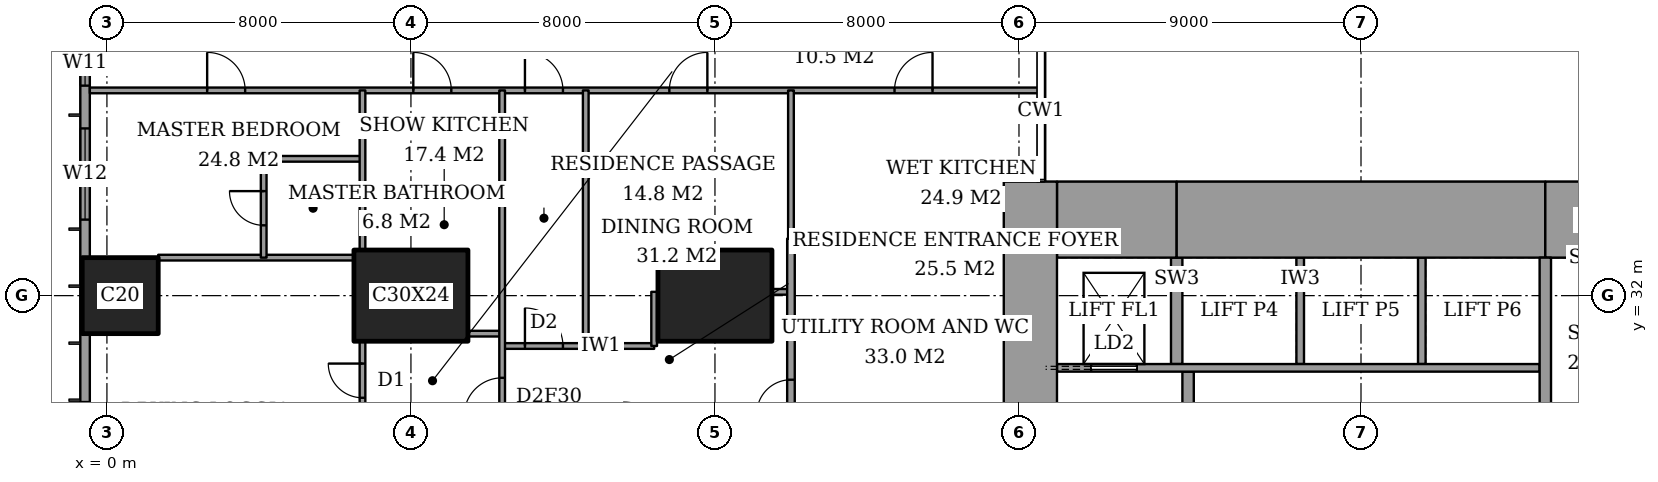
"""IFC4 building model, lengths in metres.
Left out: names, types, materials, properties, quantities, classifications, styles, units other than length and angle.
Written with IfcOpenShell. Run it as: python <this file> out.ifc"""

import sys

from ifc_helpers import new_model, si_unit, direction, frame, frame_2d, origin, origin_2d, place, context, subcontext, project, spatial, rectangle, extrude, element, fill, save


model = new_model("IFC4")
c1 = context("Model", 3, precision=1e-05, world=origin(), true_north=direction((0.0, 1.0)))
c2 = subcontext(c1, "Body", "Model", "MODEL_VIEW")
j1 = project(units=[si_unit("LENGTHUNIT", "METRE"), si_unit("PLANEANGLEUNIT", "RADIAN")], contexts=[c1])
p1 = place(None, origin())
s1 = spatial("IfcSite", under=j1, at=p1, CompositionType="ELEMENT")
p2 = place(p1, origin())
s2 = spatial("IfcBuilding", under=s1, at=p2, CompositionType="ELEMENT")
p3 = place(p2, frame((0.0, 0.0, 164.6)))
s3 = spatial("IfcBuildingStorey", under=s2, at=p3, CompositionType="ELEMENT", Elevation=164.6)
p4 = place(p3, frame((0.35, 32.0, 0.0), z_axis=(0.0, 0.0, 1.0), x_axis=(1.0, 0.0, 0.0)))
e1 = element("IfcColumn", 1, at=p4, inside=s3, PredefinedType="COLUMN", context=c2, shape_type="SweptSolid", body=[
    extrude(rectangle(XDim=2.0, YDim=2.0, at=origin_2d()), origin(), (0.0, 0.0, 1.0), 3.6),
])
for number, where, z_axis, x_axis in (
    (2, (8.0, 32.0, 0.0), (0.0, 0.0, 1.0), (1.0, 0.0, 0.0)),
    (3, (16.0, 32.0, 0.0), (0.0, 0.0, 1.0), (1.0, 0.0, 0.0)),
):
    element("IfcColumn", number, at=place(p3, frame(where, z_axis=z_axis, x_axis=x_axis)), inside=s3, PredefinedType="COLUMN", context=c2, shape_type="SweptSolid", body=[
        extrude(rectangle(XDim=3.0, YDim=2.4, at=origin_2d()), origin(), (0.0, 0.0, 1.0), 3.6),
    ])
p5 = place(p3, frame((25.0, 34.0, 0.0), z_axis=(0.0, 0.0, 1.0), x_axis=(1.0, 0.0, 0.0)))
e4 = element("IfcWall", 4, at=p5, inside=s3, PredefinedType="SHEAR", context=c2, shape_type="SweptSolid", body=[
    extrude(rectangle(XDim=3.15, YDim=2.0, at=frame_2d((1.575, 0.0))), origin(), (0.0, 0.0, 1.0), 3.6),
])
p6 = place(p3, frame((28.15, 34.0, 0.0), z_axis=(0.0, 0.0, 1.0), x_axis=(1.0, 0.0, 0.0)))
e5 = element("IfcWall", 5, at=p6, inside=s3, PredefinedType="SHEAR", context=c2, shape_type="SweptSolid", body=[
    extrude(rectangle(XDim=9.7, YDim=2.0, at=frame_2d((4.85, 0.0))), origin(), (0.0, 0.0, 1.0), 3.6),
])
p7 = place(p3, frame((37.85, 34.0, 0.0), z_axis=(0.0, 0.0, 1.0), x_axis=(1.0, 0.0, 0.0)))
e6 = element("IfcWall", 6, at=p7, inside=s3, PredefinedType="SHEAR", context=c2, shape_type="SweptSolid", body=[
    extrude(rectangle(XDim=3.15, YDim=2.0, at=frame_2d((1.575, 0.0))), origin(), (0.0, 0.0, 1.0), 3.6),
])
p8 = place(p3, frame((24.3, 23.15, 0.0), z_axis=(0.0, 0.0, 1.0), x_axis=(0.0, 1.0, 0.0)))
e7 = element("IfcWall", 7, at=p8, inside=s3, PredefinedType="SHEAR", context=c2, shape_type="SweptSolid", body=[
    extrude(rectangle(XDim=11.85, YDim=1.4, at=frame_2d((5.925, 0.0))), origin(), (0.0, 0.0, 1.0), 3.6),
])
p9 = place(p8, frame((0.75, 0.0, 0.0)))
e8 = element("IfcOpeningElement", 8, at=p9, cuts=e7, PredefinedType="OPENING", context=c2, shape_type="SweptSolid", body=[
    extrude(rectangle(XDim=1.8, YDim=2.4, at=frame_2d((0.9, 1.2))), frame((0.0, 0.71, 0.0), z_axis=(0.0, -1.0, 0.0), x_axis=(1.0, 0.0, 0.0)), (0.0, 0.0, 1.0), 1.42),
])
p10 = place(p3, frame((37.85, 24.85, 0.0), z_axis=(0.0, 0.0, 1.0), x_axis=(0.0, 1.0, 0.0)))
e9 = element("IfcWall", 9, at=p10, inside=s3, PredefinedType="SHEAR", context=c2, shape_type="SweptSolid", body=[
    extrude(rectangle(XDim=8.15, YDim=0.3, at=frame_2d((4.075, 0.0))), origin(), (0.0, 0.0, 1.0), 3.6),
])
p11 = place(p3, frame((28.45, 23.3, 0.0), z_axis=(0.0, 0.0, 1.0), x_axis=(0.0, 1.0, 0.0)))
e10 = element("IfcWall", 10, at=p11, inside=s3, PredefinedType="PARTITIONING", context=c2, shape_type="SweptSolid", body=[
    extrude(rectangle(XDim=6.7, YDim=0.3, at=frame_2d((3.35, 0.0))), origin(), (0.0, 0.0, 1.0), 3.6),
])
p12 = place(p11, frame((2.7, 0.0, 0.0)))
e11 = element("IfcOpeningElement", 11, at=p12, cuts=e10, PredefinedType="OPENING", context=c2, shape_type="SweptSolid", body=[
    extrude(rectangle(XDim=1.2, YDim=2.1, at=frame_2d((0.6, 1.05))), frame((0.0, 0.16, 0.0), z_axis=(0.0, -1.0, 0.0), x_axis=(1.0, 0.0, 0.0)), (0.0, 0.0, 1.0), 0.32),
])
p13 = place(p3, frame((-0.575, 44.825, 0.0), z_axis=(0.0, 0.0, 1.0), x_axis=(0.0, -1.0, 0.0)))
e12 = element("IfcWall", 12, at=p13, inside=s3, PredefinedType="SOLIDWALL", context=c2, shape_type="SweptSolid", body=[
    extrude(rectangle(XDim=41.65, YDim=0.25, at=frame_2d((20.825, 0.0))), origin(), (0.0, 0.0, 1.0), 3.6),
])
p14 = place(p13, frame((0.775, 0.0, 0.4)))
e13 = element("IfcOpeningElement", 13, at=p14, cuts=e12, PredefinedType="OPENING", context=c2, shape_type="SweptSolid", body=[
    extrude(rectangle(XDim=2.4, YDim=2.2, at=frame_2d((1.2, 1.1))), frame((0.0, 0.135, 0.0), z_axis=(0.0, -1.0, 0.0), x_axis=(1.0, 0.0, 0.0)), (0.0, 0.0, 1.0), 0.27),
])
p15 = place(p13, frame((6.1, 0.0, 0.4)))
e14 = element("IfcOpeningElement", 14, at=p15, cuts=e12, PredefinedType="OPENING", context=c2, shape_type="SweptSolid", body=[
    extrude(rectangle(XDim=1.2, YDim=2.2, at=frame_2d((0.6, 1.1))), frame((0.0, 0.135, 0.0), z_axis=(0.0, -1.0, 0.0), x_axis=(1.0, 0.0, 0.0)), (0.0, 0.0, 1.0), 0.27),
])
p16 = place(p13, frame((8.425, 0.0, 0.4)))
e15 = element("IfcOpeningElement", 15, at=p16, cuts=e12, PredefinedType="OPENING", context=c2, shape_type="SweptSolid", body=[
    extrude(rectangle(XDim=2.4, YDim=2.2, at=frame_2d((1.2, 1.1))), frame((0.0, 0.135, 0.0), z_axis=(0.0, -1.0, 0.0), x_axis=(1.0, 0.0, 0.0)), (0.0, 0.0, 1.0), 0.27),
])
p17 = place(p13, frame((15.625, 0.0, 0.4)))
e16 = element("IfcOpeningElement", 16, at=p17, cuts=e12, PredefinedType="OPENING", context=c2, shape_type="SweptSolid", body=[
    extrude(rectangle(XDim=2.4, YDim=2.2, at=frame_2d((1.2, 1.1))), frame((0.0, 0.135, 0.0), z_axis=(0.0, -1.0, 0.0), x_axis=(1.0, 0.0, 0.0)), (0.0, 0.0, 1.0), 0.27),
])
p18 = place(p13, frame((23.625, 0.0, 0.4)))
e17 = element("IfcOpeningElement", 17, at=p18, cuts=e12, PredefinedType="OPENING", context=c2, shape_type="SweptSolid", body=[
    extrude(rectangle(XDim=2.4, YDim=2.2, at=frame_2d((1.2, 1.1))), frame((0.0, 0.135, 0.0), z_axis=(0.0, -1.0, 0.0), x_axis=(1.0, 0.0, 0.0)), (0.0, 0.0, 1.0), 0.27),
])
p19 = place(p13, frame((30.825, 0.0, 0.4)))
e18 = element("IfcOpeningElement", 18, at=p19, cuts=e12, PredefinedType="OPENING", context=c2, shape_type="SweptSolid", body=[
    extrude(rectangle(XDim=2.4, YDim=2.2, at=frame_2d((1.2, 1.1))), frame((0.0, 0.135, 0.0), z_axis=(0.0, -1.0, 0.0), x_axis=(1.0, 0.0, 0.0)), (0.0, 0.0, 1.0), 0.27),
])
p20 = place(p13, frame((34.5, 0.0, 0.4)))
e19 = element("IfcOpeningElement", 19, at=p20, cuts=e12, PredefinedType="OPENING", context=c2, shape_type="SweptSolid", body=[
    extrude(rectangle(XDim=1.2, YDim=2.2, at=frame_2d((0.6, 1.1))), frame((0.0, 0.135, 0.0), z_axis=(0.0, -1.0, 0.0), x_axis=(1.0, 0.0, 0.0)), (0.0, 0.0, 1.0), 0.27),
])
p21 = place(p13, frame((38.475, 0.0, 0.4)))
e20 = element("IfcOpeningElement", 20, at=p21, cuts=e12, PredefinedType="OPENING", context=c2, shape_type="SweptSolid", body=[
    extrude(rectangle(XDim=2.4, YDim=2.2, at=frame_2d((1.2, 1.1))), frame((0.0, 0.135, 0.0), z_axis=(0.0, -1.0, 0.0), x_axis=(1.0, 0.0, 0.0)), (0.0, 0.0, 1.0), 0.27),
])
p22 = place(p3, frame((10.4, 30.675, 0.0), z_axis=(0.0, 0.0, 1.0), x_axis=(1.0, 0.0, 0.0)))
e21 = element("IfcWall", 21, at=p22, inside=s3, PredefinedType="PARTITIONING", context=c2, shape_type="SweptSolid", body=[
    extrude(rectangle(XDim=4.0, YDim=0.15, at=frame_2d((2.0, 0.0))), origin(), (0.0, 0.0, 1.0), 3.35),
])
p23 = place(p22, frame((0.6, 0.0, 0.0)))
e22 = element("IfcOpeningElement", 22, at=p23, cuts=e21, PredefinedType="OPENING", context=c2, shape_type="SweptSolid", body=[
    extrude(rectangle(XDim=1.0, YDim=2.1, at=frame_2d((0.5, 1.05))), frame((0.0, 0.085, 0.0), z_axis=(0.0, -1.0, 0.0), x_axis=(1.0, 0.0, 0.0)), (0.0, 0.0, 1.0), 0.17),
])
p24 = place(p3, frame((9.5, 31.0, 0.0), z_axis=(0.0, 0.0, 1.0), x_axis=(1.0, 0.0, 0.0)))
e23 = element("IfcWall", 23, at=p24, inside=s3, PredefinedType="PARTITIONING", context=c2, shape_type="SweptSolid", body=[
    extrude(rectangle(XDim=0.9, YDim=0.15, at=frame_2d((0.45, 0.0))), origin(), (0.0, 0.0, 1.0), 3.35),
])
p25 = place(p3, frame((17.5, 32.1, 0.0), z_axis=(0.0, 0.0, 1.0), x_axis=(1.0, 0.0, 0.0)))
e24 = element("IfcWall", 24, at=p25, inside=s3, PredefinedType="PARTITIONING", context=c2, shape_type="SweptSolid", body=[
    extrude(rectangle(XDim=0.5, YDim=0.15, at=frame_2d((0.25, 0.0))), origin(), (0.0, 0.0, 1.0), 2.634),
])
p26 = place(p3, frame((1.35, 33.0, 0.0), z_axis=(0.0, 0.0, 1.0), x_axis=(1.0, 0.0, 0.0)))
e25 = element("IfcWall", 25, at=p26, inside=s3, PredefinedType="PARTITIONING", context=c2, shape_type="SweptSolid", body=[
    extrude(rectangle(XDim=5.15, YDim=0.15, at=frame_2d((2.575, 0.0))), origin(), (0.0, 0.0, 1.0), 3.35),
])
p27 = place(p3, frame((18.0, 33.5, 0.0), z_axis=(0.0, 0.0, 1.0), x_axis=(1.0, 0.0, 0.0)))
e26 = element("IfcWall", 26, at=p27, inside=s3, PredefinedType="PARTITIONING", context=c2, shape_type="SweptSolid", body=[
    extrude(rectangle(XDim=6.0, YDim=0.2, at=frame_2d((3.0, 0.0))), origin(), (0.0, 0.0, 1.0), 3.35),
])
p28 = place(p3, frame((4.125, 35.6, 0.0), z_axis=(0.0, 0.0, 1.0), x_axis=(1.0, 0.0, 0.0)))
e27 = element("IfcWall", 27, at=p28, inside=s3, PredefinedType="PARTITIONING", context=c2, shape_type="SweptSolid", body=[
    extrude(rectangle(XDim=2.6, YDim=0.15, at=frame_2d((1.3, 0.0))), origin(), (0.0, 0.0, 1.0), 3.35),
])
p29 = place(p3, frame((-0.45, 37.4, 0.0), z_axis=(0.0, 0.0, 1.0), x_axis=(1.0, 0.0, 0.0)))
e28 = element("IfcWall", 28, at=p29, inside=s3, PredefinedType="PARTITIONING", context=c2, shape_type="SweptSolid", body=[
    extrude(rectangle(XDim=25.011, YDim=0.15, at=frame_2d((12.505, 0.0))), origin(), (0.0, 0.0, 1.0), 3.35),
])
p30 = place(p29, frame((11.45, 0.0, 0.0)))
e29 = element("IfcOpeningElement", 29, at=p30, cuts=e28, PredefinedType="OPENING", context=c2, shape_type="SweptSolid", body=[
    extrude(rectangle(XDim=1.0, YDim=2.1, at=frame_2d((0.5, 1.05))), frame((0.0, 0.085, 0.0), z_axis=(0.0, -1.0, 0.0), x_axis=(1.0, 0.0, 0.0)), (0.0, 0.0, 1.0), 0.17),
])
p31 = place(p29, frame((3.087, 0.0, 0.0)))
e30 = element("IfcOpeningElement", 30, at=p31, cuts=e28, PredefinedType="OPENING", context=c2, shape_type="SweptSolid", body=[
    extrude(rectangle(XDim=1.0, YDim=2.1, at=frame_2d((0.5, 1.05))), frame((0.0, 0.085, 0.0), z_axis=(0.0, -1.0, 0.0), x_axis=(1.0, 0.0, 0.0)), (0.0, 0.0, 1.0), 0.17),
])
p32 = place(p29, frame((8.512, 0.0, 0.0)))
e31 = element("IfcOpeningElement", 31, at=p32, cuts=e28, PredefinedType="OPENING", context=c2, shape_type="SweptSolid", body=[
    extrude(rectangle(XDim=1.0, YDim=2.1, at=frame_2d((0.5, 1.05))), frame((0.0, 0.085, 0.0), z_axis=(0.0, -1.0, 0.0), x_axis=(1.0, 0.0, 0.0)), (0.0, 0.0, 1.0), 0.17),
])
p33 = place(p29, frame((15.25, 0.0, 0.0)))
e32 = element("IfcOpeningElement", 32, at=p33, cuts=e28, PredefinedType="OPENING", context=c2, shape_type="SweptSolid", body=[
    extrude(rectangle(XDim=1.0, YDim=2.1, at=frame_2d((0.5, 1.05))), frame((0.0, 0.085, 0.0), z_axis=(0.0, -1.0, 0.0), x_axis=(1.0, 0.0, 0.0)), (0.0, 0.0, 1.0), 0.17),
])
p34 = place(p29, frame((21.175, 0.0, 0.0)))
e33 = element("IfcOpeningElement", 33, at=p34, cuts=e28, PredefinedType="OPENING", context=c2, shape_type="SweptSolid", body=[
    extrude(rectangle(XDim=1.0, YDim=2.1, at=frame_2d((0.5, 1.05))), frame((0.0, 0.085, 0.0), z_axis=(0.0, -1.0, 0.0), x_axis=(1.0, 0.0, 0.0)), (0.0, 0.0, 1.0), 0.17),
])
p35 = place(p3, frame((4.125, 33.0, 0.0), z_axis=(0.0, 0.0, 1.0), x_axis=(0.0, 1.0, 0.0)))
e34 = element("IfcWall", 34, at=p35, inside=s3, PredefinedType="PARTITIONING", context=c2, shape_type="SweptSolid", body=[
    extrude(rectangle(XDim=2.6, YDim=0.15, at=frame_2d((1.3, 0.0))), origin(), (0.0, 0.0, 1.0), 3.35),
])
p36 = place(p35, frame((0.85, 0.0, 0.0)))
e35 = element("IfcOpeningElement", 35, at=p36, cuts=e34, PredefinedType="OPENING", context=c2, shape_type="SweptSolid", body=[
    extrude(rectangle(XDim=0.9, YDim=2.1, at=frame_2d((0.45, 1.05))), frame((0.0, 0.085, 0.0), z_axis=(0.0, -1.0, 0.0), x_axis=(1.0, 0.0, 0.0)), (0.0, 0.0, 1.0), 0.17),
])
p37 = place(p3, frame((6.725, 28.35, 0.0), z_axis=(0.0, 0.0, 1.0), x_axis=(0.0, 1.0, 0.0)))
e36 = element("IfcWall", 36, at=p37, inside=s3, PredefinedType="PARTITIONING", context=c2, shape_type="SweptSolid", body=[
    extrude(rectangle(XDim=2.45, YDim=0.15, at=frame_2d((1.225, 0.0))), origin(), (0.0, 0.0, 1.0), 3.35),
])
p38 = place(p37, frame((0.962, 0.0, 0.0)))
e37 = element("IfcOpeningElement", 37, at=p38, cuts=e36, PredefinedType="OPENING", context=c2, shape_type="SweptSolid", body=[
    extrude(rectangle(XDim=0.9, YDim=2.1, at=frame_2d((0.45, 1.05))), frame((0.0, 0.085, 0.0), z_axis=(0.0, -1.0, 0.0), x_axis=(1.0, 0.0, 0.0)), (0.0, 0.0, 1.0), 0.17),
])
p39 = place(p3, frame((6.725, 33.2, 0.0), z_axis=(0.0, 0.0, 1.0), x_axis=(0.0, 1.0, 0.0)))
e38 = element("IfcWall", 38, at=p39, inside=s3, PredefinedType="PARTITIONING", context=c2, shape_type="SweptSolid", body=[
    extrude(rectangle(XDim=4.2, YDim=0.15, at=frame_2d((2.1, 0.0))), origin(), (0.0, 0.0, 1.0), 3.35),
])
p40 = place(p3, frame((10.4, 28.0, 0.0), z_axis=(0.0, 0.0, 1.0), x_axis=(0.0, 1.0, 0.0)))
e39 = element("IfcWall", 39, at=p40, inside=s3, PredefinedType="PARTITIONING", context=c2, shape_type="SweptSolid", body=[
    extrude(rectangle(XDim=9.4, YDim=0.15, at=frame_2d((4.7, 0.0))), origin(), (0.0, 0.0, 1.0), 3.35),
])
p41 = place(p40, frame((0.837, 0.0, 0.0)))
e40 = element("IfcOpeningElement", 40, at=p41, cuts=e39, PredefinedType="OPENING", context=c2, shape_type="SweptSolid", body=[
    extrude(rectangle(XDim=1.0, YDim=2.1, at=frame_2d((0.5, 1.05))), frame((0.0, 0.085, 0.0), z_axis=(0.0, -1.0, 0.0), x_axis=(1.0, 0.0, 0.0)), (0.0, 0.0, 1.0), 0.17),
])
p42 = place(p3, frame((12.6, 30.675, 0.0), z_axis=(0.0, 0.0, 1.0), x_axis=(0.0, 1.0, 0.0)))
e41 = element("IfcWall", 41, at=p42, inside=s3, PredefinedType="PARTITIONING", context=c2, shape_type="SweptSolid", body=[
    extrude(rectangle(XDim=6.725, YDim=0.15, at=frame_2d((3.362, 0.0))), origin(), (0.0, 0.0, 1.0), 3.35),
])
p43 = place(p3, frame((14.4, 30.675, 0.0), z_axis=(0.0, 0.0, 1.0), x_axis=(0.0, 1.0, 0.0)))
e42 = element("IfcWall", 42, at=p43, inside=s3, PredefinedType="PARTITIONING", context=c2, shape_type="SweptSolid", body=[
    extrude(rectangle(XDim=1.425, YDim=0.15, at=frame_2d((0.712, 0.0))), origin(), (0.0, 0.0, 1.0), 3.35),
])
p44 = place(p3, frame((18.0, 28.0, 0.0), z_axis=(0.0, 0.0, 1.0), x_axis=(0.0, 1.0, 0.0)))
e43 = element("IfcWall", 43, at=p44, inside=s3, PredefinedType="PARTITIONING", context=c2, shape_type="SweptSolid", body=[
    extrude(rectangle(XDim=5.5, YDim=0.2, at=frame_2d((2.75, 0.0))), origin(), (0.0, 0.0, 1.0), 3.35),
])
p45 = place(p44, frame((0.887, 0.0, 0.0)))
e44 = element("IfcOpeningElement", 44, at=p45, cuts=e43, PredefinedType="OPENING", context=c2, shape_type="SweptSolid", body=[
    extrude(rectangle(XDim=0.9, YDim=2.1, at=frame_2d((0.45, 1.05))), frame((0.0, 0.11, 0.0), z_axis=(0.0, -1.0, 0.0), x_axis=(1.0, 0.0, 0.0)), (0.0, 0.0, 1.0), 0.22),
])
p46 = place(p3, frame((18.0, 33.5, 0.0), z_axis=(0.0, 0.0, 1.0), x_axis=(0.0, 1.0, 0.0)))
e45 = element("IfcWall", 45, at=p46, inside=s3, PredefinedType="PARTITIONING", context=c2, shape_type="SweptSolid", body=[
    extrude(rectangle(XDim=3.9, YDim=0.15, at=frame_2d((1.95, 0.0))), origin(), (0.0, 0.0, 1.0), 3.35),
])
p47 = place(p3, frame((25.0, 30.1, 0.0), z_axis=(0.0, 0.0, 1.0), x_axis=(1.0, 0.0, 0.0)))
e46 = element("IfcWall", 46, at=p47, inside=s3, PredefinedType="PARTITIONING", context=c2, shape_type="SweptSolid", body=[
    extrude(rectangle(XDim=12.7, YDim=0.2, at=frame_2d((6.35, 0.0))), origin(), (0.0, 0.0, 1.0), 3.6),
])
p48 = place(p47, frame((0.9, 0.0, 0.0)))
e47 = element("IfcOpeningElement", 47, at=p48, cuts=e46, PredefinedType="OPENING", context=c2, shape_type="SweptSolid", body=[
    extrude(rectangle(XDim=1.2, YDim=2.1, at=frame_2d((0.6, 1.05))), frame((0.0, 0.11, 0.0), z_axis=(0.0, -1.0, 0.0), x_axis=(1.0, 0.0, 0.0)), (0.0, 0.0, 1.0), 0.22),
])
for number, where, z_axis, x_axis in (
    (48, (31.4, 30.2, 0.0), (0.0, 0.0, 1.0), (0.0, 1.0, 0.0)),
    (49, (34.6, 30.2, 0.0), (0.0, 0.0, 1.0), (0.0, 1.0, 0.0)),
):
    element("IfcWall", number, at=place(p3, frame(where, z_axis=z_axis, x_axis=x_axis)), inside=s3, PredefinedType="PARTITIONING", context=c2, shape_type="SweptSolid", body=[
        extrude(rectangle(XDim=2.8, YDim=0.2, at=frame_2d((1.4, 0.0))), origin(), (0.0, 0.0, 1.0), 3.6),
    ])
p49 = place(p3, frame((28.15, 30.2, 0.0), z_axis=(0.0, 0.0, 1.0), x_axis=(0.0, 1.0, 0.0)))
e50 = element("IfcWall", 50, at=p49, inside=s3, PredefinedType="SHEAR", context=c2, shape_type="SweptSolid", body=[
    extrude(rectangle(XDim=2.8, YDim=0.3, at=frame_2d((1.4, 0.0))), origin(), (0.0, 0.0, 1.0), 3.6),
])
p50 = place(p15, origin())
e51 = element("IfcWindow", 51, at=p50, inside=s3, PartitioningType="SINGLE_PANEL", PredefinedType="WINDOW", context=c2, shape_type="SweptSolid", body=[
    extrude(rectangle(XDim=1.2, YDim=2.2, at=frame_2d((0.6, 1.1))), frame((0.0, 0.03, 0.0), z_axis=(0.0, -1.0, 0.0), x_axis=(1.0, 0.0, 0.0)), (0.0, 0.0, 1.0), 0.06),
])
fill(e14, e51)
p51 = place(p16, origin())
e52 = element("IfcWindow", 52, at=p51, inside=s3, PartitioningType="SINGLE_PANEL", PredefinedType="WINDOW", context=c2, shape_type="SweptSolid", body=[
    extrude(rectangle(XDim=2.4, YDim=2.2, at=frame_2d((1.2, 1.1))), frame((0.0, 0.03, 0.0), z_axis=(0.0, -1.0, 0.0), x_axis=(1.0, 0.0, 0.0)), (0.0, 0.0, 1.0), 0.06),
])
fill(e15, e52)
p52 = place(p30, origin())
e53 = element("IfcDoor", 53, at=p52, inside=s3, OperationType="SINGLE_SWING_RIGHT", PredefinedType="DOOR", context=c2, shape_type="SweptSolid", body=[
    extrude(rectangle(XDim=1.0, YDim=2.1, at=frame_2d((0.5, 1.05))), frame((0.0, 0.025, 0.0), z_axis=(0.0, -1.0, 0.0), x_axis=(1.0, 0.0, 0.0)), (0.0, 0.0, 1.0), 0.05),
])
fill(e29, e53)
p53 = place(p36, origin())
e54 = element("IfcDoor", 54, at=p53, inside=s3, OperationType="SINGLE_SWING_LEFT", PredefinedType="DOOR", context=c2, shape_type="SweptSolid", body=[
    extrude(rectangle(XDim=0.9, YDim=2.1, at=frame_2d((0.45, 1.05))), frame((0.0, 0.025, 0.0), z_axis=(0.0, -1.0, 0.0), x_axis=(1.0, 0.0, 0.0)), (0.0, 0.0, 1.0), 0.05),
])
fill(e35, e54)
p54 = place(p31, origin())
e55 = element("IfcDoor", 55, at=p54, inside=s3, OperationType="SINGLE_SWING_RIGHT", PredefinedType="DOOR", context=c2, shape_type="SweptSolid", body=[
    extrude(rectangle(XDim=1.0, YDim=2.1, at=frame_2d((0.5, 1.05))), frame((0.0, 0.025, 0.0), z_axis=(0.0, -1.0, 0.0), x_axis=(1.0, 0.0, 0.0)), (0.0, 0.0, 1.0), 0.05),
])
fill(e30, e55)
p55 = place(p38, origin())
e56 = element("IfcDoor", 56, at=p55, inside=s3, OperationType="SINGLE_SWING_LEFT", PredefinedType="DOOR", context=c2, shape_type="SweptSolid", body=[
    extrude(rectangle(XDim=0.9, YDim=2.1, at=frame_2d((0.45, 1.05))), frame((0.0, 0.025, 0.0), z_axis=(0.0, -1.0, 0.0), x_axis=(1.0, 0.0, 0.0)), (0.0, 0.0, 1.0), 0.05),
])
fill(e37, e56)
p56 = place(p32, origin())
e57 = element("IfcDoor", 57, at=p56, inside=s3, OperationType="SINGLE_SWING_RIGHT", PredefinedType="DOOR", context=c2, shape_type="SweptSolid", body=[
    extrude(rectangle(XDim=1.0, YDim=2.1, at=frame_2d((0.5, 1.05))), frame((0.0, 0.025, 0.0), z_axis=(0.0, -1.0, 0.0), x_axis=(1.0, 0.0, 0.0)), (0.0, 0.0, 1.0), 0.05),
])
fill(e31, e57)
p57 = place(p41, origin())
e58 = element("IfcDoor", 58, at=p57, inside=s3, OperationType="SINGLE_SWING_RIGHT", PredefinedType="DOOR", context=c2, shape_type="SweptSolid", body=[
    extrude(rectangle(XDim=1.0, YDim=2.1, at=frame_2d((0.5, 1.05))), frame((0.0, 0.025, 0.0), z_axis=(0.0, -1.0, 0.0), x_axis=(1.0, 0.0, 0.0)), (0.0, 0.0, 1.0), 0.05),
])
fill(e40, e58)
p58 = place(p23, origin())
e59 = element("IfcDoor", 59, at=p58, inside=s3, OperationType="SINGLE_SWING_RIGHT", PredefinedType="DOOR", context=c2, shape_type="SweptSolid", body=[
    extrude(rectangle(XDim=1.0, YDim=2.1, at=frame_2d((0.5, 1.05))), frame((0.0, 0.025, 0.0), z_axis=(0.0, -1.0, 0.0), x_axis=(1.0, 0.0, 0.0)), (0.0, 0.0, 1.0), 0.05),
])
fill(e22, e59)
p59 = place(p33, origin())
e60 = element("IfcDoor", 60, at=p59, inside=s3, OperationType="SINGLE_SWING_LEFT", PredefinedType="DOOR", context=c2, shape_type="SweptSolid", body=[
    extrude(rectangle(XDim=1.0, YDim=2.1, at=frame_2d((0.5, 1.05))), frame((0.0, 0.025, 0.0), z_axis=(0.0, -1.0, 0.0), x_axis=(1.0, 0.0, 0.0)), (0.0, 0.0, 1.0), 0.05),
])
fill(e32, e60)
p60 = place(p34, origin())
e61 = element("IfcDoor", 61, at=p60, inside=s3, OperationType="SINGLE_SWING_LEFT", PredefinedType="DOOR", context=c2, shape_type="SweptSolid", body=[
    extrude(rectangle(XDim=1.0, YDim=2.1, at=frame_2d((0.5, 1.05))), frame((0.0, 0.025, 0.0), z_axis=(0.0, -1.0, 0.0), x_axis=(1.0, 0.0, 0.0)), (0.0, 0.0, 1.0), 0.05),
])
fill(e33, e61)
p61 = place(p45, origin())
e62 = element("IfcDoor", 62, at=p61, inside=s3, OperationType="SINGLE_SWING_RIGHT", PredefinedType="DOOR", context=c2, shape_type="SweptSolid", body=[
    extrude(rectangle(XDim=0.9, YDim=2.1, at=frame_2d((0.45, 1.05))), frame((0.0, 0.025, 0.0), z_axis=(0.0, -1.0, 0.0), x_axis=(1.0, 0.0, 0.0)), (0.0, 0.0, 1.0), 0.05),
])
fill(e44, e62)
p62 = place(p48, origin())
e63 = element("IfcDoor", 63, at=p62, inside=s3, OperationType="SLIDING_TO_LEFT", PredefinedType="DOOR", context=c2, shape_type="SweptSolid", body=[
    extrude(rectangle(XDim=1.2, YDim=2.1, at=frame_2d((0.6, 1.05))), frame((0.0, 0.025, 0.0), z_axis=(0.0, -1.0, 0.0), x_axis=(1.0, 0.0, 0.0)), (0.0, 0.0, 1.0), 0.05),
])
fill(e47, e63)
save(model, sys.argv[1])
